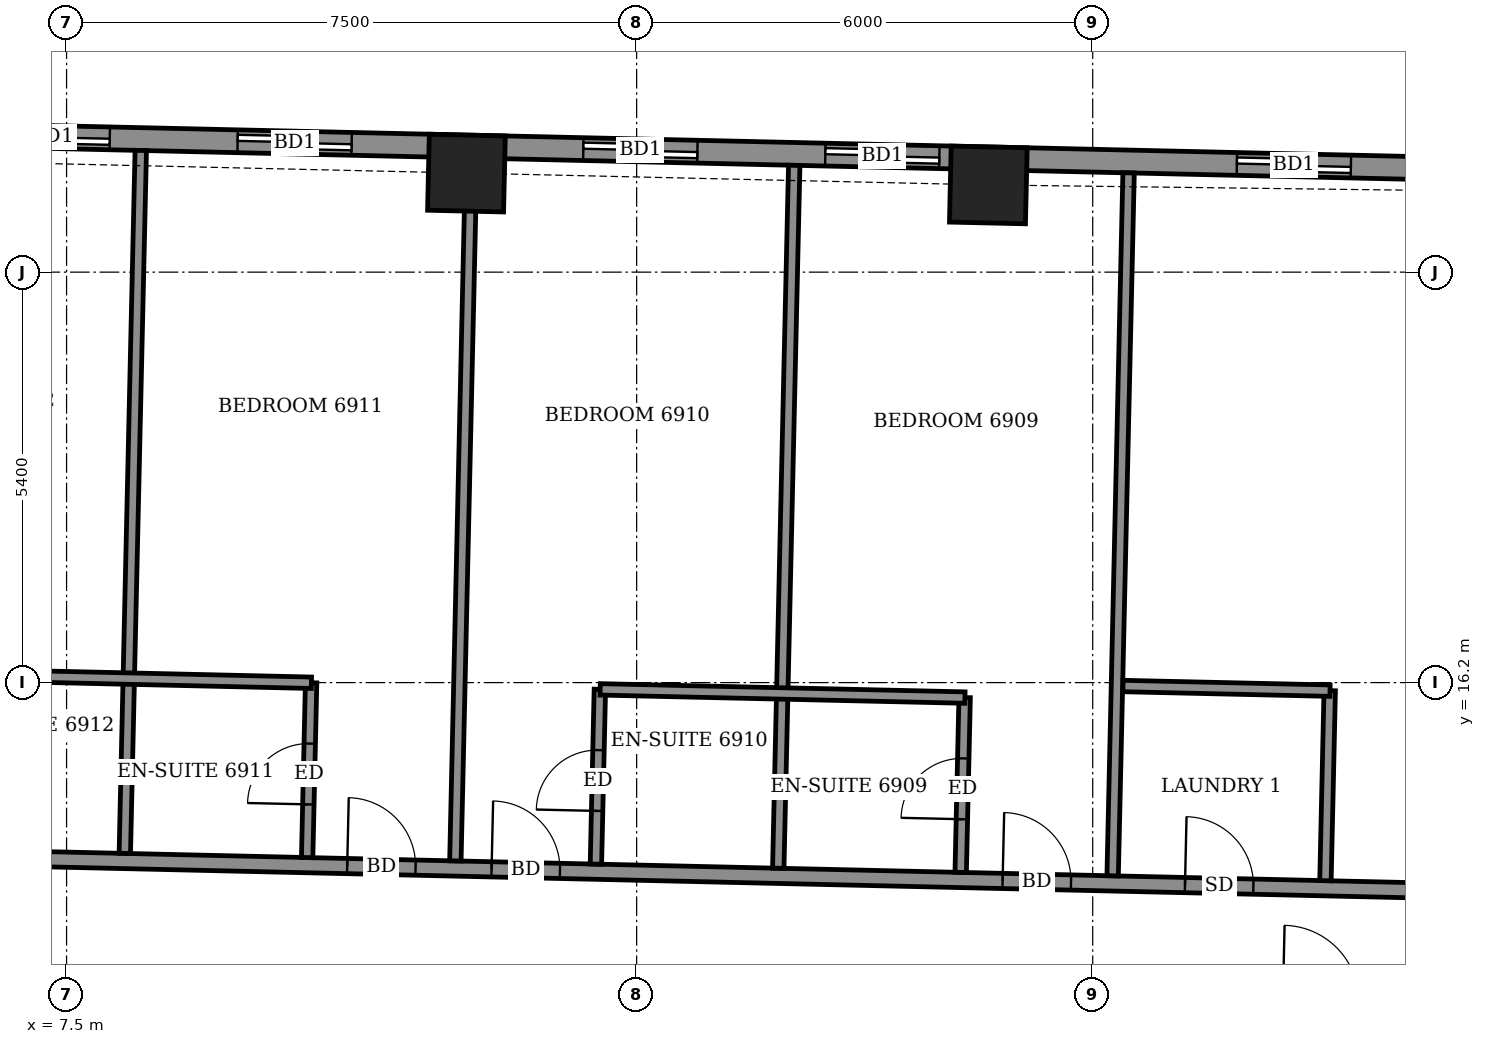
"""IFC4 building model, lengths in metres.
Left out: names, types, materials, properties, quantities, classifications, styles, units other than length and angle.
Written with IfcOpenShell. Run it as: python <this file> out.ifc"""

import sys

from ifc_helpers import new_model, si_unit, direction, frame, frame_2d, origin, origin_2d, place, context, subcontext, project, spatial, rectangle, extrude, element, fill, save


model = new_model("IFC4")
c1 = context("Model", 3, precision=1e-05, world=origin(), true_north=direction((0.0, 1.0)))
c2 = subcontext(c1, "Body", "Model", "MODEL_VIEW")
j1 = project(units=[si_unit("LENGTHUNIT", "METRE"), si_unit("PLANEANGLEUNIT", "RADIAN")], contexts=[c1])
p1 = place(None, origin())
s1 = spatial("IfcSite", under=j1, at=p1, CompositionType="ELEMENT")
p2 = place(p1, origin())
s2 = spatial("IfcBuilding", under=s1, at=p2, CompositionType="ELEMENT")
p3 = place(p2, frame((0.0, 0.0, 271.7)))
s3 = spatial("IfcBuildingStorey", under=s2, at=p3, CompositionType="ELEMENT", Elevation=271.7)
for number, where, z_axis, x_axis in (
    (1, (19.627, 22.747, -0.55), (0.0, 0.0, 1.0), (-1.0, 0.023, 0.0)),
    (2, (12.761, 22.903, -0.55), (0.0, 0.0, 1.0), (-1.0, 0.023, 0.0)),
):
    element("IfcColumn", number, at=place(p3, frame(where, z_axis=z_axis, x_axis=x_axis)), inside=s3, PredefinedType="COLUMN", context=c2, shape_type="SweptSolid", body=[
        extrude(rectangle(XDim=1.0, YDim=1.0, at=origin_2d()), origin(), (0.0, 0.0, 1.0), 3.6),
    ])
p4 = place(p3, frame((26.35, 22.945, 0.0), z_axis=(0.0, 0.0, 1.0), x_axis=(-0.999742523712, 0.022691105788, 0.0)))
e3 = element("IfcWall", 3, at=p4, inside=s3, PredefinedType="SOLIDWALL", context=c2, shape_type="SweptSolid", body=[
    extrude(rectangle(XDim=47.771, YDim=0.3, at=frame_2d((23.886, 0.0))), origin(), (0.0, 0.0, 1.0), 2.55),
])
p5 = place(p4, frame((1.954, 0.0, 0.0)))
e4 = element("IfcOpeningElement", 4, at=p5, cuts=e3, PredefinedType="OPENING", context=c2, shape_type="SweptSolid", body=[
    extrude(rectangle(XDim=1.5, YDim=2.4, at=frame_2d((0.75, 1.2))), frame((0.0, 0.16, 0.0), z_axis=(0.0, -1.0, 0.0), x_axis=(1.0, 0.0, 0.0)), (0.0, 0.0, 1.0), 0.32),
])
p6 = place(p4, frame((7.37, 0.0, 0.0)))
e5 = element("IfcOpeningElement", 5, at=p6, cuts=e3, PredefinedType="OPENING", context=c2, shape_type="SweptSolid", body=[
    extrude(rectangle(XDim=1.5, YDim=2.4, at=frame_2d((0.75, 1.2))), frame((0.0, 0.16, 0.0), z_axis=(0.0, -1.0, 0.0), x_axis=(1.0, 0.0, 0.0)), (0.0, 0.0, 1.0), 0.32),
])
p7 = place(p4, frame((10.554, 0.0, 0.0)))
e6 = element("IfcOpeningElement", 6, at=p7, cuts=e3, PredefinedType="OPENING", context=c2, shape_type="SweptSolid", body=[
    extrude(rectangle(XDim=1.5, YDim=2.4, at=frame_2d((0.75, 1.2))), frame((0.0, 0.16, 0.0), z_axis=(0.0, -1.0, 0.0), x_axis=(1.0, 0.0, 0.0)), (0.0, 0.0, 1.0), 0.32),
])
p8 = place(p4, frame((15.104, 0.0, 0.0)))
e7 = element("IfcOpeningElement", 7, at=p8, cuts=e3, PredefinedType="OPENING", context=c2, shape_type="SweptSolid", body=[
    extrude(rectangle(XDim=1.5, YDim=2.4, at=frame_2d((0.75, 1.2))), frame((0.0, 0.16, 0.0), z_axis=(0.0, -1.0, 0.0), x_axis=(1.0, 0.0, 0.0)), (0.0, 0.0, 1.0), 0.32),
])
p9 = place(p4, frame((18.287, 0.0, 0.0)))
e8 = element("IfcOpeningElement", 8, at=p9, cuts=e3, PredefinedType="OPENING", context=c2, shape_type="SweptSolid", body=[
    extrude(rectangle(XDim=1.5, YDim=2.4, at=frame_2d((0.75, 1.2))), frame((0.0, 0.16, 0.0), z_axis=(0.0, -1.0, 0.0), x_axis=(1.0, 0.0, 0.0)), (0.0, 0.0, 1.0), 0.32),
])
p10 = place(p4, frame((23.622, 0.0, 0.0)))
e9 = element("IfcOpeningElement", 9, at=p10, cuts=e3, PredefinedType="OPENING", context=c2, shape_type="SweptSolid", body=[
    extrude(rectangle(XDim=1.5, YDim=2.4, at=frame_2d((0.75, 1.2))), frame((0.0, 0.16, 0.0), z_axis=(0.0, -1.0, 0.0), x_axis=(1.0, 0.0, 0.0)), (0.0, 0.0, 1.0), 0.32),
])
p11 = place(p4, frame((28.521, 0.0, 0.0)))
e10 = element("IfcOpeningElement", 10, at=p11, cuts=e3, PredefinedType="OPENING", context=c2, shape_type="SweptSolid", body=[
    extrude(rectangle(XDim=1.5, YDim=2.4, at=frame_2d((0.75, 1.2))), frame((0.0, 0.16, 0.0), z_axis=(0.0, -1.0, 0.0), x_axis=(1.0, 0.0, 0.0)), (0.0, 0.0, 1.0), 0.32),
])
p12 = place(p4, frame((31.705, 0.0, 0.0)))
e11 = element("IfcOpeningElement", 11, at=p12, cuts=e3, PredefinedType="OPENING", context=c2, shape_type="SweptSolid", body=[
    extrude(rectangle(XDim=1.5, YDim=2.4, at=frame_2d((0.75, 1.2))), frame((0.0, 0.16, 0.0), z_axis=(0.0, -1.0, 0.0), x_axis=(1.0, 0.0, 0.0)), (0.0, 0.0, 1.0), 0.32),
])
p13 = place(p4, frame((36.722, 0.0, 0.0)))
e12 = element("IfcOpeningElement", 12, at=p13, cuts=e3, PredefinedType="OPENING", context=c2, shape_type="SweptSolid", body=[
    extrude(rectangle(XDim=1.5, YDim=2.4, at=frame_2d((0.75, 1.2))), frame((0.0, 0.16, 0.0), z_axis=(0.0, -1.0, 0.0), x_axis=(1.0, 0.0, 0.0)), (0.0, 0.0, 1.0), 0.32),
])
p14 = place(p4, frame((41.963, 0.0, 0.0)))
e13 = element("IfcOpeningElement", 13, at=p14, cuts=e3, PredefinedType="OPENING", context=c2, shape_type="SweptSolid", body=[
    extrude(rectangle(XDim=1.5, YDim=2.4, at=frame_2d((0.75, 1.2))), frame((0.0, 0.16, 0.0), z_axis=(0.0, -1.0, 0.0), x_axis=(1.0, 0.0, 0.0)), (0.0, 0.0, 1.0), 0.32),
])
p15 = place(p4, frame((44.436, 0.0, 0.9)))
e14 = element("IfcOpeningElement", 14, at=p15, cuts=e3, PredefinedType="OPENING", context=c2, shape_type="SweptSolid", body=[
    extrude(rectangle(XDim=2.4, YDim=1.5, at=frame_2d((1.2, 0.75))), frame((0.0, 0.16, 0.0), z_axis=(0.0, -1.0, 0.0), x_axis=(1.0, 0.0, 0.0)), (0.0, 0.0, 1.0), 0.32),
])
p16 = place(p3, frame((-24.474, 14.596, 0.0), z_axis=(0.0, 0.0, 1.0), x_axis=(0.999742424031, -0.022695497208, 0.0)))
e15 = element("IfcWall", 15, at=p16, inside=s3, PredefinedType="PARTITIONING", context=c2, shape_type="SweptSolid", body=[
    extrude(rectangle(XDim=52.872, YDim=0.2, at=frame_2d((26.436, 0.0))), origin(), (0.0, 0.0, 1.0), 3.05),
])
p17 = place(p16, frame((51.161, 0.0, 0.0)))
e16 = element("IfcOpeningElement", 16, at=p17, cuts=e15, PredefinedType="OPENING", context=c2, shape_type="SweptSolid", body=[
    extrude(rectangle(XDim=1.0, YDim=2.1, at=frame_2d((0.5, 1.05))), frame((0.0, 0.11, 0.0), z_axis=(0.0, -1.0, 0.0), x_axis=(1.0, 0.0, 0.0)), (0.0, 0.0, 1.0), 0.22),
])
p18 = place(p16, frame((46.7, 0.0, 0.0)))
e17 = element("IfcOpeningElement", 17, at=p18, cuts=e15, PredefinedType="OPENING", context=c2, shape_type="SweptSolid", body=[
    extrude(rectangle(XDim=0.9, YDim=2.1, at=frame_2d((0.45, 1.05))), frame((0.0, 0.11, 0.0), z_axis=(0.0, -1.0, 0.0), x_axis=(1.0, 0.0, 0.0)), (0.0, 0.0, 1.0), 0.22),
])
p19 = place(p16, frame((44.3, 0.0, 0.0)))
e18 = element("IfcOpeningElement", 18, at=p19, cuts=e15, PredefinedType="OPENING", context=c2, shape_type="SweptSolid", body=[
    extrude(rectangle(XDim=0.9, YDim=2.1, at=frame_2d((0.45, 1.05))), frame((0.0, 0.11, 0.0), z_axis=(0.0, -1.0, 0.0), x_axis=(1.0, 0.0, 0.0)), (0.0, 0.0, 1.0), 0.22),
])
p20 = place(p16, frame((37.575, 0.0, 0.0)))
e19 = element("IfcOpeningElement", 19, at=p20, cuts=e15, PredefinedType="OPENING", context=c2, shape_type="SweptSolid", body=[
    extrude(rectangle(XDim=0.9, YDim=2.1, at=frame_2d((0.45, 1.05))), frame((0.0, 0.11, 0.0), z_axis=(0.0, -1.0, 0.0), x_axis=(1.0, 0.0, 0.0)), (0.0, 0.0, 1.0), 0.22),
])
p21 = place(p16, frame((35.675, 0.0, 0.0)))
e20 = element("IfcOpeningElement", 20, at=p21, cuts=e15, PredefinedType="OPENING", context=c2, shape_type="SweptSolid", body=[
    extrude(rectangle(XDim=0.9, YDim=2.1, at=frame_2d((0.45, 1.05))), frame((0.0, 0.11, 0.0), z_axis=(0.0, -1.0, 0.0), x_axis=(1.0, 0.0, 0.0)), (0.0, 0.0, 1.0), 0.22),
])
p22 = place(p16, frame((28.95, 0.0, 0.0)))
e21 = element("IfcOpeningElement", 21, at=p22, cuts=e15, PredefinedType="OPENING", context=c2, shape_type="SweptSolid", body=[
    extrude(rectangle(XDim=0.9, YDim=2.1, at=frame_2d((0.45, 1.05))), frame((0.0, 0.11, 0.0), z_axis=(0.0, -1.0, 0.0), x_axis=(1.0, 0.0, 0.0)), (0.0, 0.0, 1.0), 0.22),
])
p23 = place(p16, frame((27.0, 0.0, 0.0)))
e22 = element("IfcOpeningElement", 22, at=p23, cuts=e15, PredefinedType="OPENING", context=c2, shape_type="SweptSolid", body=[
    extrude(rectangle(XDim=0.9, YDim=2.1, at=frame_2d((0.45, 1.05))), frame((0.0, 0.11, 0.0), z_axis=(0.0, -1.0, 0.0), x_axis=(1.0, 0.0, 0.0)), (0.0, 0.0, 1.0), 0.22),
])
p24 = place(p16, frame((20.2, 0.0, 0.0)))
e23 = element("IfcOpeningElement", 23, at=p24, cuts=e15, PredefinedType="OPENING", context=c2, shape_type="SweptSolid", body=[
    extrude(rectangle(XDim=0.9, YDim=2.1, at=frame_2d((0.45, 1.05))), frame((0.0, 0.11, 0.0), z_axis=(0.0, -1.0, 0.0), x_axis=(1.0, 0.0, 0.0)), (0.0, 0.0, 1.0), 0.22),
])
p25 = place(p16, frame((18.25, 0.0, 0.0)))
e24 = element("IfcOpeningElement", 24, at=p25, cuts=e15, PredefinedType="OPENING", context=c2, shape_type="SweptSolid", body=[
    extrude(rectangle(XDim=0.9, YDim=2.1, at=frame_2d((0.45, 1.05))), frame((0.0, 0.11, 0.0), z_axis=(0.0, -1.0, 0.0), x_axis=(1.0, 0.0, 0.0)), (0.0, 0.0, 1.0), 0.22),
])
p26 = place(p16, frame((11.5, 0.0, 0.0)))
e25 = element("IfcOpeningElement", 25, at=p26, cuts=e15, PredefinedType="OPENING", context=c2, shape_type="SweptSolid", body=[
    extrude(rectangle(XDim=0.9, YDim=2.1, at=frame_2d((0.45, 1.05))), frame((0.0, 0.11, 0.0), z_axis=(0.0, -1.0, 0.0), x_axis=(1.0, 0.0, 0.0)), (0.0, 0.0, 1.0), 0.22),
])
p27 = place(p16, frame((9.475, 0.0, 0.0)))
e26 = element("IfcOpeningElement", 26, at=p27, cuts=e15, PredefinedType="OPENING", context=c2, shape_type="SweptSolid", body=[
    extrude(rectangle(XDim=0.9, YDim=2.1, at=frame_2d((0.45, 1.05))), frame((0.0, 0.11, 0.0), z_axis=(0.0, -1.0, 0.0), x_axis=(1.0, 0.0, 0.0)), (0.0, 0.0, 1.0), 0.22),
])
p28 = place(p16, frame((2.293, 0.0, 0.0)))
e27 = element("IfcOpeningElement", 27, at=p28, cuts=e15, PredefinedType="OPENING", context=c2, shape_type="SweptSolid", body=[
    extrude(rectangle(XDim=1.0, YDim=2.1, at=frame_2d((0.5, 1.05))), frame((0.0, 0.11, 0.0), z_axis=(0.0, -1.0, 0.0), x_axis=(1.0, 0.0, 0.0)), (0.0, 0.0, 1.0), 0.22),
])
p29 = place(p3, frame((8.266, 13.953, 0.0), z_axis=(0.0, 0.0, 1.0), x_axis=(0.022697424684, 0.999742380272, 0.0)))
e28 = element("IfcWall", 28, at=p29, inside=s3, PredefinedType="PARTITIONING", context=c2, shape_type="SweptSolid", body=[
    extrude(rectangle(XDim=9.25, YDim=0.15, at=frame_2d((4.625, 0.0))), origin(), (0.0, 0.0, 1.0), 2.55),
])
p30 = place(p3, frame((10.665, 13.898, 0.0), z_axis=(0.0, 0.0, 1.0), x_axis=(0.022603288534, 0.999744513037, 0.0)))
e29 = element("IfcWall", 29, at=p30, inside=s3, PredefinedType="PARTITIONING", context=c2, shape_type="SweptSolid", body=[
    extrude(rectangle(XDim=2.301, YDim=0.15, at=frame_2d((1.15, 0.0))), origin(), (0.0, 0.0, 1.0), 3.05),
])
p31 = place(p30, frame((0.7, 0.0, 0.0)))
e30 = element("IfcOpeningElement", 30, at=p31, cuts=e29, PredefinedType="OPENING", context=c2, shape_type="SweptSolid", body=[
    extrude(rectangle(XDim=0.8, YDim=2.1, at=frame_2d((0.4, 1.05))), frame((0.0, 0.085, 0.0), z_axis=(0.0, -1.0, 0.0), x_axis=(1.0, 0.0, 0.0)), (0.0, 0.0, 1.0), 0.17),
])
p32 = place(p3, frame((12.615, 13.854, 0.0), z_axis=(0.0, 0.0, 1.0), x_axis=(0.022591909275, 0.999744770247, 0.0)))
e31 = element("IfcWall", 31, at=p32, inside=s3, PredefinedType="PARTITIONING", context=c2, shape_type="SweptSolid", body=[
    extrude(rectangle(XDim=9.25, YDim=0.15, at=frame_2d((4.625, 0.0))), origin(), (0.0, 0.0, 1.0), 3.05),
])
p33 = place(p3, frame((14.464, 13.812, 0.0), z_axis=(0.0, 0.0, 1.0), x_axis=(0.022603288534, 0.999744513037, 0.0)))
e32 = element("IfcWall", 32, at=p33, inside=s3, PredefinedType="PARTITIONING", context=c2, shape_type="SweptSolid", body=[
    extrude(rectangle(XDim=2.301, YDim=0.15, at=frame_2d((1.15, 0.0))), origin(), (0.0, 0.0, 1.0), 3.05),
])
p34 = place(p33, frame((0.7, 0.0, 0.0)))
e33 = element("IfcOpeningElement", 33, at=p34, cuts=e32, PredefinedType="OPENING", context=c2, shape_type="SweptSolid", body=[
    extrude(rectangle(XDim=0.8, YDim=2.1, at=frame_2d((0.4, 1.05))), frame((0.0, 0.085, 0.0), z_axis=(0.0, -1.0, 0.0), x_axis=(1.0, 0.0, 0.0)), (0.0, 0.0, 1.0), 0.17),
])
p35 = place(p3, frame((16.863, 13.758, 0.0), z_axis=(0.0, 0.0, 1.0), x_axis=(0.0227004195, 0.999742312276, 0.0)))
e34 = element("IfcWall", 34, at=p35, inside=s3, PredefinedType="PARTITIONING", context=c2, shape_type="SweptSolid", body=[
    extrude(rectangle(XDim=9.249, YDim=0.15, at=frame_2d((4.625, 0.0))), origin(), (0.0, 0.0, 1.0), 2.55),
])
p36 = place(p3, frame((19.263, 13.703, 0.0), z_axis=(0.0, 0.0, 1.0), x_axis=(0.022603288534, 0.999744513037, 0.0)))
e35 = element("IfcWall", 35, at=p36, inside=s3, PredefinedType="PARTITIONING", context=c2, shape_type="SweptSolid", body=[
    extrude(rectangle(XDim=2.301, YDim=0.15, at=frame_2d((1.15, 0.0))), origin(), (0.0, 0.0, 1.0), 3.05),
])
p37 = place(p36, frame((0.7, 0.0, 0.0)))
e36 = element("IfcOpeningElement", 36, at=p37, cuts=e35, PredefinedType="OPENING", context=c2, shape_type="SweptSolid", body=[
    extrude(rectangle(XDim=0.8, YDim=2.1, at=frame_2d((0.4, 1.05))), frame((0.0, 0.085, 0.0), z_axis=(0.0, -1.0, 0.0), x_axis=(1.0, 0.0, 0.0)), (0.0, 0.0, 1.0), 0.17),
])
p38 = place(p3, frame((21.262, 13.658, 0.0), z_axis=(0.0, 0.0, 1.0), x_axis=(0.022697424684, 0.999742380272, 0.0)))
e37 = element("IfcWall", 37, at=p38, inside=s3, PredefinedType="PARTITIONING", context=c2, shape_type="SweptSolid", body=[
    extrude(rectangle(XDim=9.25, YDim=0.15, at=frame_2d((4.625, 0.0))), origin(), (0.0, 0.0, 1.0), 2.55),
])
p39 = place(p3, frame((24.062, 13.594, 0.0), z_axis=(0.0, 0.0, 1.0), x_axis=(0.022357691225, 0.99975003558, 0.0)))
e38 = element("IfcWall", 38, at=p39, inside=s3, PredefinedType="PARTITIONING", context=c2, shape_type="SweptSolid", body=[
    extrude(rectangle(XDim=2.501, YDim=0.15, at=frame_2d((1.25, 0.0))), origin(), (0.0, 0.0, 1.0), 3.05),
])
p40 = place(p3, frame((5.922, 16.307, 0.0), z_axis=(0.0, 0.0, 1.0), x_axis=(0.999742675121, -0.022684433919, 0.0)))
e39 = element("IfcWall", 39, at=p40, inside=s3, PredefinedType="PARTITIONING", context=c2, shape_type="SweptSolid", body=[
    extrude(rectangle(XDim=4.8, YDim=0.15, at=frame_2d((2.4, 0.0))), origin(), (0.0, 0.0, 1.0), 3.05),
])
p41 = place(p3, frame((14.52, 16.111, 0.0), z_axis=(0.0, 0.0, 1.0), x_axis=(0.999746149754, -0.022530780096, 0.0)))
e40 = element("IfcWall", 40, at=p41, inside=s3, PredefinedType="PARTITIONING", context=c2, shape_type="SweptSolid", body=[
    extrude(rectangle(XDim=4.8, YDim=0.15, at=frame_2d((2.4, 0.0))), origin(), (0.0, 0.0, 1.0), 3.05),
])
p42 = place(p3, frame((21.398, 16.155, 0.0), z_axis=(0.0, 0.0, 1.0), x_axis=(0.999749092391, -0.022399827308, 0.0)))
e41 = element("IfcWall", 41, at=p42, inside=s3, PredefinedType="PARTITIONING", context=c2, shape_type="SweptSolid", body=[
    extrude(rectangle(XDim=2.725, YDim=0.15, at=frame_2d((1.362, 0.0))), origin(), (0.0, 0.0, 1.0), 3.05),
])
p43 = place(p5, origin())
e42 = element("IfcDoor", 42, at=p43, inside=s3, OperationType="SLIDING_TO_LEFT", PredefinedType="DOOR", context=c2, shape_type="SweptSolid", body=[
    extrude(rectangle(XDim=1.5, YDim=2.4, at=frame_2d((0.75, 1.2))), frame((0.0, 0.025, 0.0), z_axis=(0.0, -1.0, 0.0), x_axis=(1.0, 0.0, 0.0)), (0.0, 0.0, 1.0), 0.05),
])
fill(e4, e42)
p44 = place(p6, origin())
e43 = element("IfcDoor", 43, at=p44, inside=s3, OperationType="SLIDING_TO_LEFT", PredefinedType="DOOR", context=c2, shape_type="SweptSolid", body=[
    extrude(rectangle(XDim=1.5, YDim=2.4, at=frame_2d((0.75, 1.2))), frame((0.0, 0.025, 0.0), z_axis=(0.0, -1.0, 0.0), x_axis=(1.0, 0.0, 0.0)), (0.0, 0.0, 1.0), 0.05),
])
fill(e5, e43)
p45 = place(p7, origin())
e44 = element("IfcDoor", 44, at=p45, inside=s3, OperationType="SLIDING_TO_LEFT", PredefinedType="DOOR", context=c2, shape_type="SweptSolid", body=[
    extrude(rectangle(XDim=1.5, YDim=2.4, at=frame_2d((0.75, 1.2))), frame((0.0, 0.025, 0.0), z_axis=(0.0, -1.0, 0.0), x_axis=(1.0, 0.0, 0.0)), (0.0, 0.0, 1.0), 0.05),
])
fill(e6, e44)
p46 = place(p8, origin())
e45 = element("IfcDoor", 45, at=p46, inside=s3, OperationType="SLIDING_TO_LEFT", PredefinedType="DOOR", context=c2, shape_type="SweptSolid", body=[
    extrude(rectangle(XDim=1.5, YDim=2.4, at=frame_2d((0.75, 1.2))), frame((0.0, 0.025, 0.0), z_axis=(0.0, -1.0, 0.0), x_axis=(1.0, 0.0, 0.0)), (0.0, 0.0, 1.0), 0.05),
])
fill(e7, e45)
p47 = place(p9, origin())
e46 = element("IfcDoor", 46, at=p47, inside=s3, OperationType="SLIDING_TO_LEFT", PredefinedType="DOOR", context=c2, shape_type="SweptSolid", body=[
    extrude(rectangle(XDim=1.5, YDim=2.4, at=frame_2d((0.75, 1.2))), frame((0.0, 0.025, 0.0), z_axis=(0.0, -1.0, 0.0), x_axis=(1.0, 0.0, 0.0)), (0.0, 0.0, 1.0), 0.05),
])
fill(e8, e46)
p48 = place(p18, origin())
e47 = element("IfcDoor", 47, at=p48, inside=s3, OperationType="SINGLE_SWING_RIGHT", PredefinedType="DOOR", context=c2, shape_type="SweptSolid", body=[
    extrude(rectangle(XDim=0.9, YDim=2.1, at=frame_2d((0.45, 1.05))), frame((0.0, 0.025, 0.0), z_axis=(0.0, -1.0, 0.0), x_axis=(1.0, 0.0, 0.0)), (0.0, 0.0, 1.0), 0.05),
])
fill(e17, e47)
p49 = place(p19, origin())
e48 = element("IfcDoor", 48, at=p49, inside=s3, OperationType="SINGLE_SWING_LEFT", PredefinedType="DOOR", context=c2, shape_type="SweptSolid", body=[
    extrude(rectangle(XDim=0.9, YDim=2.1, at=frame_2d((0.45, 1.05))), frame((0.0, 0.025, 0.0), z_axis=(0.0, -1.0, 0.0), x_axis=(1.0, 0.0, 0.0)), (0.0, 0.0, 1.0), 0.05),
])
fill(e18, e48)
p50 = place(p37, origin())
e49 = element("IfcDoor", 49, at=p50, inside=s3, OperationType="SINGLE_SWING_LEFT", PredefinedType="DOOR", context=c2, shape_type="SweptSolid", body=[
    extrude(rectangle(XDim=0.8, YDim=2.1, at=frame_2d((0.4, 1.05))), frame((0.0, 0.025, 0.0), z_axis=(0.0, -1.0, 0.0), x_axis=(1.0, 0.0, 0.0)), (0.0, 0.0, 1.0), 0.05),
])
fill(e36, e49)
p51 = place(p20, origin())
e50 = element("IfcDoor", 50, at=p51, inside=s3, OperationType="SINGLE_SWING_RIGHT", PredefinedType="DOOR", context=c2, shape_type="SweptSolid", body=[
    extrude(rectangle(XDim=0.9, YDim=2.1, at=frame_2d((0.45, 1.05))), frame((0.0, 0.025, 0.0), z_axis=(0.0, -1.0, 0.0), x_axis=(1.0, 0.0, 0.0)), (0.0, 0.0, 1.0), 0.05),
])
fill(e19, e50)
p52 = place(p34, origin())
e51 = element("IfcDoor", 51, at=p52, inside=s3, OperationType="SINGLE_SWING_RIGHT", PredefinedType="DOOR", context=c2, shape_type="SweptSolid", body=[
    extrude(rectangle(XDim=0.8, YDim=2.1, at=frame_2d((0.4, 1.05))), frame((0.0, 0.025, 0.0), z_axis=(0.0, -1.0, 0.0), x_axis=(1.0, 0.0, 0.0)), (0.0, 0.0, 1.0), 0.05),
])
fill(e33, e51)
p53 = place(p21, origin())
e52 = element("IfcDoor", 52, at=p53, inside=s3, OperationType="SINGLE_SWING_LEFT", PredefinedType="DOOR", context=c2, shape_type="SweptSolid", body=[
    extrude(rectangle(XDim=0.9, YDim=2.1, at=frame_2d((0.45, 1.05))), frame((0.0, 0.025, 0.0), z_axis=(0.0, -1.0, 0.0), x_axis=(1.0, 0.0, 0.0)), (0.0, 0.0, 1.0), 0.05),
])
fill(e20, e52)
p54 = place(p31, origin())
e53 = element("IfcDoor", 53, at=p54, inside=s3, OperationType="SINGLE_SWING_LEFT", PredefinedType="DOOR", context=c2, shape_type="SweptSolid", body=[
    extrude(rectangle(XDim=0.8, YDim=2.1, at=frame_2d((0.4, 1.05))), frame((0.0, 0.025, 0.0), z_axis=(0.0, -1.0, 0.0), x_axis=(1.0, 0.0, 0.0)), (0.0, 0.0, 1.0), 0.05),
])
fill(e30, e53)
save(model, sys.argv[1])
